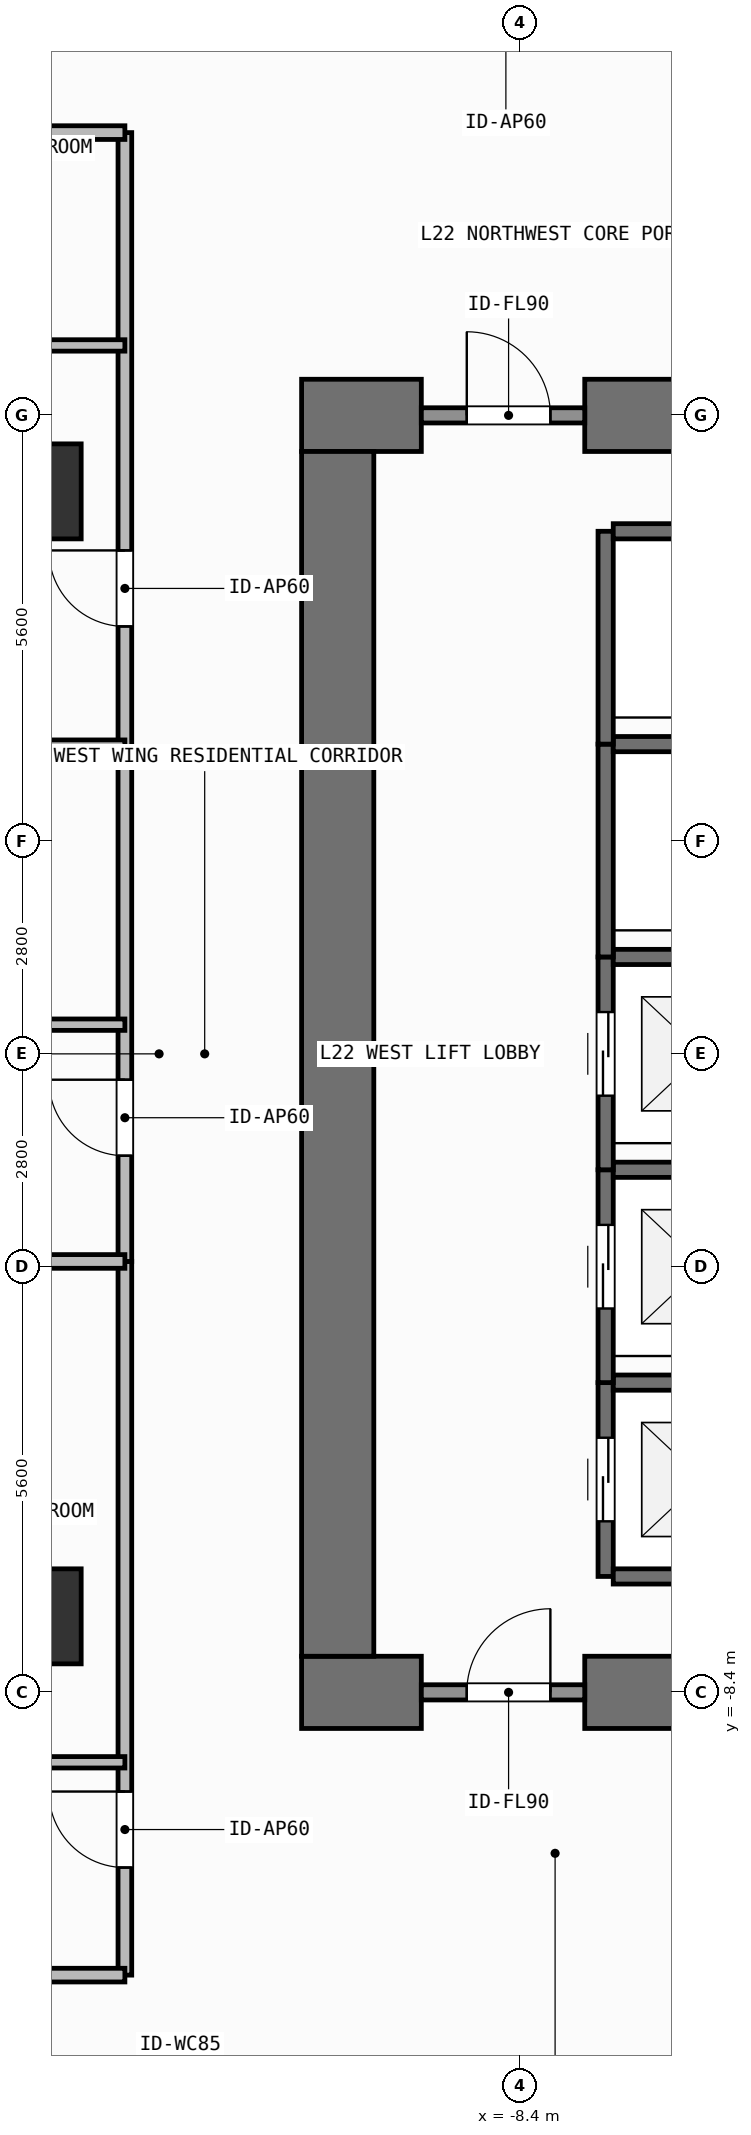
"""IFC4 building model, lengths in metres.
Left out: names, types, materials, properties, quantities, classifications, styles, units other than length and angle.
Written with IfcOpenShell. Run it as: python <this file> out.ifc"""

import sys

from ifc_helpers import new_model, si_unit, direction, frame, frame_2d, origin, origin_2d, place, context, subcontext, project, spatial, rectangle, extrude, element, fill, save


model = new_model("IFC4")
c1 = context("Model", 3, precision=1e-05, world=origin(), true_north=direction((0.0, 1.0)))
c2 = subcontext(c1, "Body", "Model", "MODEL_VIEW")
j1 = project(units=[si_unit("LENGTHUNIT", "METRE"), si_unit("PLANEANGLEUNIT", "RADIAN")], contexts=[c1])
p1 = place(None, origin())
s1 = spatial("IfcSite", under=j1, at=p1, CompositionType="ELEMENT")
p2 = place(p1, origin())
s2 = spatial("IfcBuilding", under=s1, at=p2, CompositionType="ELEMENT")
p3 = place(p2, frame((0.0, 0.0, 89.1)))
s3 = spatial("IfcBuildingStorey", under=s2, at=p3, CompositionType="ELEMENT", Elevation=89.1)
p4 = place(p3, frame((-11.275, -8.4, 0.0), z_axis=(0.0, 0.0, 1.0), x_axis=(1.0, 0.0, 0.0)))
e1 = element("IfcWall", 1, at=p4, inside=s3, PredefinedType="SHEAR", context=c2, shape_type="SweptSolid", body=[
    extrude(rectangle(XDim=1.575, YDim=0.95, at=frame_2d((0.788, 0.0))), origin(), (0.0, 0.0, 1.0), 3.9),
])
p5 = place(p3, frame((-7.55, -8.4, 0.0), z_axis=(0.0, 0.0, 1.0), x_axis=(1.0, 0.0, 0.0)))
e2 = element("IfcWall", 2, at=p5, inside=s3, PredefinedType="SHEAR", context=c2, shape_type="SweptSolid", body=[
    extrude(rectangle(XDim=3.35, YDim=0.95, at=frame_2d((1.675, 0.0))), origin(), (0.0, 0.0, 1.0), 3.9),
])
p6 = place(p3, frame((-11.275, 8.4, 0.0), z_axis=(0.0, 0.0, 1.0), x_axis=(1.0, 0.0, 0.0)))
e3 = element("IfcWall", 3, at=p6, inside=s3, PredefinedType="SHEAR", context=c2, shape_type="SweptSolid", body=[
    extrude(rectangle(XDim=1.575, YDim=0.95, at=frame_2d((0.788, 0.0))), origin(), (0.0, 0.0, 1.0), 3.9),
])
p7 = place(p3, frame((-7.55, 8.4, 0.0), z_axis=(0.0, 0.0, 1.0), x_axis=(1.0, 0.0, 0.0)))
e4 = element("IfcWall", 4, at=p7, inside=s3, PredefinedType="SHEAR", context=c2, shape_type="SweptSolid", body=[
    extrude(rectangle(XDim=16.425, YDim=0.95, at=frame_2d((8.212, 0.0))), origin(), (0.0, 0.0, 1.0), 3.9),
])
p8 = place(p3, frame((-10.8, -7.925, 0.0), z_axis=(0.0, 0.0, 1.0), x_axis=(0.0, 1.0, 0.0)))
e5 = element("IfcWall", 5, at=p8, inside=s3, PredefinedType="SHEAR", context=c2, shape_type="SweptSolid", body=[
    extrude(rectangle(XDim=15.85, YDim=0.95, at=frame_2d((7.925, 0.0))), origin(), (0.0, 0.0, 1.0), 3.9),
])
for number, where, z_axis, x_axis in (
    (6, (-14.8, -7.4, 0.0), (0.0, 0.0, 1.0), (1.0, 0.0, 0.0)),
    (7, (-14.8, 7.4, 0.0), (0.0, 0.0, 1.0), (1.0, 0.0, 0.0)),
):
    element("IfcColumn", number, at=place(p3, frame(where, z_axis=z_axis, x_axis=x_axis)), inside=s3, PredefinedType="COLUMN", context=c2, shape_type="SweptSolid", body=[
        extrude(rectangle(XDim=1.25, YDim=1.25, at=origin_2d()), origin(), (0.0, 0.0, 1.0), 3.9),
    ])
p9 = place(p3, frame((-7.275, -6.875, 0.0), z_axis=(0.0, 0.0, 1.0), x_axis=(0.0, 1.0, 0.0)))
e8 = element("IfcWall", 8, at=p9, inside=s3, PredefinedType="SHEAR", context=c2, shape_type="SweptSolid", body=[
    extrude(rectangle(XDim=2.55, YDim=0.2, at=frame_2d((1.275, 0.0))), origin(), (0.0, 0.0, 1.0), 3.68),
])
p10 = place(p9, frame((0.725, 0.0, 0.0)))
e9 = element("IfcOpeningElement", 9, at=p10, cuts=e8, PredefinedType="OPENING", context=c2, shape_type="SweptSolid", body=[
    extrude(rectangle(XDim=1.1, YDim=2.2, at=frame_2d((0.55, 1.1))), frame((0.0, 0.11, 0.0), z_axis=(0.0, -1.0, 0.0), x_axis=(1.0, 0.0, 0.0)), (0.0, 0.0, 1.0), 0.22),
])
for number, where, z_axis, x_axis in (
    (10, (-7.175, -6.875, 0.0), (0.0, 0.0, 1.0), (1.0, 0.0, 0.0)),
    (11, (-7.175, -4.325, 0.0), (0.0, 0.0, 1.0), (1.0, 0.0, 0.0)),
):
    element("IfcWall", number, at=place(p3, frame(where, z_axis=z_axis, x_axis=x_axis)), inside=s3, PredefinedType="SHEAR", context=c2, shape_type="SweptSolid", body=[
        extrude(rectangle(XDim=2.35, YDim=0.2, at=frame_2d((1.175, 0.0))), origin(), (0.0, 0.0, 1.0), 3.68),
    ])
p11 = place(p3, frame((-7.275, -4.325, 0.0), z_axis=(0.0, 0.0, 1.0), x_axis=(0.0, 1.0, 0.0)))
e12 = element("IfcWall", 12, at=p11, inside=s3, PredefinedType="SHEAR", context=c2, shape_type="SweptSolid", body=[
    extrude(rectangle(XDim=2.8, YDim=0.2, at=frame_2d((1.4, 0.0))), origin(), (0.0, 0.0, 1.0), 3.68),
])
p12 = place(p11, frame((0.975, 0.0, 0.0)))
e13 = element("IfcOpeningElement", 13, at=p12, cuts=e12, PredefinedType="OPENING", context=c2, shape_type="SweptSolid", body=[
    extrude(rectangle(XDim=1.1, YDim=2.2, at=frame_2d((0.55, 1.1))), frame((0.0, 0.11, 0.0), z_axis=(0.0, -1.0, 0.0), x_axis=(1.0, 0.0, 0.0)), (0.0, 0.0, 1.0), 0.22),
])
p13 = place(p3, frame((-7.175, -1.525, 0.0), z_axis=(0.0, 0.0, 1.0), x_axis=(1.0, 0.0, 0.0)))
e14 = element("IfcWall", 14, at=p13, inside=s3, PredefinedType="SHEAR", context=c2, shape_type="SweptSolid", body=[
    extrude(rectangle(XDim=2.35, YDim=0.2, at=frame_2d((1.175, 0.0))), origin(), (0.0, 0.0, 1.0), 3.68),
])
p14 = place(p3, frame((-7.275, -1.525, 0.0), z_axis=(0.0, 0.0, 1.0), x_axis=(0.0, 1.0, 0.0)))
e15 = element("IfcWall", 15, at=p14, inside=s3, PredefinedType="SHEAR", context=c2, shape_type="SweptSolid", body=[
    extrude(rectangle(XDim=2.8, YDim=0.2, at=frame_2d((1.4, 0.0))), origin(), (0.0, 0.0, 1.0), 3.68),
])
p15 = place(p14, frame((0.975, 0.0, 0.0)))
e16 = element("IfcOpeningElement", 16, at=p15, cuts=e15, PredefinedType="OPENING", context=c2, shape_type="SweptSolid", body=[
    extrude(rectangle(XDim=1.1, YDim=2.2, at=frame_2d((0.55, 1.1))), frame((0.0, 0.11, 0.0), z_axis=(0.0, -1.0, 0.0), x_axis=(1.0, 0.0, 0.0)), (0.0, 0.0, 1.0), 0.22),
])
p16 = place(p3, frame((-7.175, 1.275, 0.0), z_axis=(0.0, 0.0, 1.0), x_axis=(1.0, 0.0, 0.0)))
e17 = element("IfcWall", 17, at=p16, inside=s3, PredefinedType="SHEAR", context=c2, shape_type="SweptSolid", body=[
    extrude(rectangle(XDim=2.35, YDim=0.2, at=frame_2d((1.175, 0.0))), origin(), (0.0, 0.0, 1.0), 3.68),
])
p17 = place(p3, frame((-7.275, 1.275, 0.0), z_axis=(0.0, 0.0, 1.0), x_axis=(0.0, 1.0, 0.0)))
e18 = element("IfcWall", 18, at=p17, inside=s3, PredefinedType="SHEAR", context=c2, shape_type="SweptSolid", body=[
    extrude(rectangle(XDim=2.8, YDim=0.2, at=frame_2d((1.4, 0.0))), origin(), (0.0, 0.0, 1.0), 3.68),
])
p18 = place(p3, frame((-7.175, 4.075, 0.0), z_axis=(0.0, 0.0, 1.0), x_axis=(1.0, 0.0, 0.0)))
e19 = element("IfcWall", 19, at=p18, inside=s3, PredefinedType="SHEAR", context=c2, shape_type="SweptSolid", body=[
    extrude(rectangle(XDim=2.35, YDim=0.2, at=frame_2d((1.175, 0.0))), origin(), (0.0, 0.0, 1.0), 3.68),
])
p19 = place(p3, frame((-7.275, 4.075, 0.0), z_axis=(0.0, 0.0, 1.0), x_axis=(0.0, 1.0, 0.0)))
e20 = element("IfcWall", 20, at=p19, inside=s3, PredefinedType="SHEAR", context=c2, shape_type="SweptSolid", body=[
    extrude(rectangle(XDim=2.8, YDim=0.2, at=frame_2d((1.4, 0.0))), origin(), (0.0, 0.0, 1.0), 3.68),
])
p20 = place(p3, frame((-7.175, 6.875, 0.0), z_axis=(0.0, 0.0, 1.0), x_axis=(1.0, 0.0, 0.0)))
e21 = element("IfcWall", 21, at=p20, inside=s3, PredefinedType="SHEAR", context=c2, shape_type="SweptSolid", body=[
    extrude(rectangle(XDim=2.35, YDim=0.2, at=frame_2d((1.175, 0.0))), origin(), (0.0, 0.0, 1.0), 3.68),
])
p21 = place(p3, frame((-9.7, -8.4, 0.0), z_axis=(0.0, 0.0, 1.0), x_axis=(1.0, 0.0, 0.0)))
e22 = element("IfcWall", 22, at=p21, inside=s3, PredefinedType="SOLIDWALL", context=c2, shape_type="SweptSolid", body=[
    extrude(rectangle(XDim=2.15, YDim=0.2, at=frame_2d((1.075, 0.0))), origin(), (0.0, 0.0, 1.0), 2.72),
])
p22 = place(p21, frame((0.598, 0.0, 0.0)))
e23 = element("IfcOpeningElement", 23, at=p22, cuts=e22, PredefinedType="OPENING", context=c2, shape_type="SweptSolid", body=[
    extrude(rectangle(XDim=1.1, YDim=2.15, at=frame_2d((0.55, 1.075))), frame((0.0, 0.11, 0.0), z_axis=(0.0, -1.0, 0.0), x_axis=(1.0, 0.0, 0.0)), (0.0, 0.0, 1.0), 0.22),
])
p23 = place(p3, frame((-9.7, 8.4, 0.0), z_axis=(0.0, 0.0, 1.0), x_axis=(1.0, 0.0, 0.0)))
e24 = element("IfcWall", 24, at=p23, inside=s3, PredefinedType="SOLIDWALL", context=c2, shape_type="SweptSolid", body=[
    extrude(rectangle(XDim=2.15, YDim=0.2, at=frame_2d((1.075, 0.0))), origin(), (0.0, 0.0, 1.0), 2.72),
])
p24 = place(p23, frame((0.598, 0.0, 0.0)))
e25 = element("IfcOpeningElement", 25, at=p24, cuts=e24, PredefinedType="OPENING", context=c2, shape_type="SweptSolid", body=[
    extrude(rectangle(XDim=1.1, YDim=2.15, at=frame_2d((0.55, 1.075))), frame((0.0, 0.11, 0.0), z_axis=(0.0, -1.0, 0.0), x_axis=(1.0, 0.0, 0.0)), (0.0, 0.0, 1.0), 0.22),
])
p25 = place(p3, frame((-13.6, -12.12, 0.0), z_axis=(0.0, 0.0, 1.0), x_axis=(0.0, 1.0, 0.0)))
e26 = element("IfcWall", 26, at=p25, inside=s3, PredefinedType="PARTITIONING", context=c2, shape_type="SweptSolid", body=[
    extrude(rectangle(XDim=9.389, YDim=0.18, at=frame_2d((4.695, 0.0))), origin(), (0.0, 0.0, 1.0), 3.68),
])
p26 = place(p25, frame((1.415, 0.0, 0.0)))
e27 = element("IfcOpeningElement", 27, at=p26, cuts=e26, PredefinedType="OPENING", context=c2, shape_type="SweptSolid", body=[
    extrude(rectangle(XDim=1.0, YDim=2.2, at=frame_2d((0.5, 1.1))), frame((0.0, 0.1, 0.0), z_axis=(0.0, -1.0, 0.0), x_axis=(1.0, 0.0, 0.0)), (0.0, 0.0, 1.0), 0.2),
])
p27 = place(p3, frame((-16.863, -9.32, 0.0), z_axis=(0.0, 0.0, 1.0), x_axis=(1.0, 0.0, 0.0)))
e28 = element("IfcWall", 28, at=p27, inside=s3, PredefinedType="PARTITIONING", context=c2, shape_type="SweptSolid", body=[
    extrude(rectangle(XDim=3.263, YDim=0.15, at=frame_2d((1.631, 0.0))), origin(), (0.0, 0.0, 1.0), 3.68),
])
p28 = place(p27, frame((0.509, 0.0, 0.0)))
e29 = element("IfcOpeningElement", 29, at=p28, cuts=e28, PredefinedType="OPENING", context=c2, shape_type="SweptSolid", body=[
    extrude(rectangle(XDim=0.85, YDim=2.1, at=frame_2d((0.425, 1.05))), frame((0.0, 0.085, 0.0), z_axis=(0.0, -1.0, 0.0), x_axis=(1.0, 0.0, 0.0)), (0.0, 0.0, 1.0), 0.17),
])
p29 = place(p3, frame((-13.6, -2.731, 0.0), z_axis=(0.0, 0.0, 1.0), x_axis=(0.0, 1.0, 0.0)))
e30 = element("IfcWall", 30, at=p29, inside=s3, PredefinedType="PARTITIONING", context=c2, shape_type="SweptSolid", body=[
    extrude(rectangle(XDim=6.771, YDim=0.18, at=frame_2d((3.385, 0.0))), origin(), (0.0, 0.0, 1.0), 3.68),
])
p30 = place(p29, frame((1.391, 0.0, 0.0)))
e31 = element("IfcOpeningElement", 31, at=p30, cuts=e30, PredefinedType="OPENING", context=c2, shape_type="SweptSolid", body=[
    extrude(rectangle(XDim=1.0, YDim=2.2, at=frame_2d((0.5, 1.1))), frame((0.0, 0.1, 0.0), z_axis=(0.0, -1.0, 0.0), x_axis=(1.0, 0.0, 0.0)), (0.0, 0.0, 1.0), 0.2),
])
p31 = place(p3, frame((-16.902, 0.384, 0.0), z_axis=(0.0, 0.0, 1.0), x_axis=(1.0, 0.0, 0.0)))
e32 = element("IfcWall", 32, at=p31, inside=s3, PredefinedType="PARTITIONING", context=c2, shape_type="SweptSolid", body=[
    extrude(rectangle(XDim=3.302, YDim=0.15, at=frame_2d((1.651, 0.0))), origin(), (0.0, 0.0, 1.0), 3.68),
])
p32 = place(p31, frame((1.226, 0.0, 0.0)))
e33 = element("IfcOpeningElement", 33, at=p32, cuts=e32, PredefinedType="OPENING", context=c2, shape_type="SweptSolid", body=[
    extrude(rectangle(XDim=0.85, YDim=2.1, at=frame_2d((0.425, 1.05))), frame((0.0, 0.085, 0.0), z_axis=(0.0, -1.0, 0.0), x_axis=(1.0, 0.0, 0.0)), (0.0, 0.0, 1.0), 0.17),
])
p33 = place(p3, frame((-13.6, 4.04, 0.0), z_axis=(0.0, 0.0, 1.0), x_axis=(0.0, 1.0, 0.0)))
e34 = element("IfcWall", 34, at=p33, inside=s3, PredefinedType="PARTITIONING", context=c2, shape_type="SweptSolid", body=[
    extrude(rectangle(XDim=8.08, YDim=0.18, at=frame_2d((4.04, 0.0))), origin(), (0.0, 0.0, 1.0), 3.68),
])
p34 = place(p33, frame((1.583, 0.0, 0.0)))
e35 = element("IfcOpeningElement", 35, at=p34, cuts=e34, PredefinedType="OPENING", context=c2, shape_type="SweptSolid", body=[
    extrude(rectangle(XDim=1.0, YDim=2.2, at=frame_2d((0.5, 1.1))), frame((0.0, 0.1, 0.0), z_axis=(0.0, -1.0, 0.0), x_axis=(1.0, 0.0, 0.0)), (0.0, 0.0, 1.0), 0.2),
])
p35 = place(p3, frame((-16.902, 9.32, 0.0), z_axis=(0.0, 0.0, 1.0), x_axis=(1.0, 0.0, 0.0)))
e36 = element("IfcWall", 36, at=p35, inside=s3, PredefinedType="PARTITIONING", context=c2, shape_type="SweptSolid", body=[
    extrude(rectangle(XDim=3.302, YDim=0.15, at=frame_2d((1.651, 0.0))), origin(), (0.0, 0.0, 1.0), 3.68),
])
p36 = place(p35, frame((0.515, 0.0, 0.0)))
e37 = element("IfcOpeningElement", 37, at=p36, cuts=e36, PredefinedType="OPENING", context=c2, shape_type="SweptSolid", body=[
    extrude(rectangle(XDim=0.85, YDim=2.1, at=frame_2d((0.425, 1.05))), frame((0.0, 0.085, 0.0), z_axis=(0.0, -1.0, 0.0), x_axis=(1.0, 0.0, 0.0)), (0.0, 0.0, 1.0), 0.17),
])
for number, where, z_axis, x_axis in (
    (38, (-27.93, -2.731, 0.0), (0.0, 0.0, 1.0), (1.0, 0.0, 0.0)),
    (39, (-27.93, 4.04, 0.0), (0.0, 0.0, 1.0), (1.0, 0.0, 0.0)),
    (40, (-27.93, -12.12, 0.0), (0.0, 0.0, 1.0), (1.0, 0.0, 0.0)),
    (41, (-27.93, 12.12, 0.0), (0.0, 0.0, 1.0), (1.0, 0.0, 0.0)),
):
    element("IfcWall", number, at=place(p3, frame(where, z_axis=z_axis, x_axis=x_axis)), inside=s3, PredefinedType="PARTITIONING", context=c2, shape_type="SweptSolid", body=[
        extrude(rectangle(XDim=14.33, YDim=0.18, at=frame_2d((7.165, 0.0))), origin(), (0.0, 0.0, 1.0), 3.68),
    ])
p37 = place(p10, origin())
e42 = element("IfcDoor", 42, at=p37, inside=s3, OperationType="SLIDING_TO_LEFT", PredefinedType="DOOR", context=c2, shape_type="SweptSolid", body=[
    extrude(rectangle(XDim=1.1, YDim=2.2, at=frame_2d((0.55, 1.1))), frame((0.0, 0.025, 0.0), z_axis=(0.0, -1.0, 0.0), x_axis=(1.0, 0.0, 0.0)), (0.0, 0.0, 1.0), 0.05),
])
fill(e9, e42)
p38 = place(p12, origin())
e43 = element("IfcDoor", 43, at=p38, inside=s3, OperationType="SLIDING_TO_LEFT", PredefinedType="DOOR", context=c2, shape_type="SweptSolid", body=[
    extrude(rectangle(XDim=1.1, YDim=2.2, at=frame_2d((0.55, 1.1))), frame((0.0, 0.025, 0.0), z_axis=(0.0, -1.0, 0.0), x_axis=(1.0, 0.0, 0.0)), (0.0, 0.0, 1.0), 0.05),
])
fill(e13, e43)
p39 = place(p15, origin())
e44 = element("IfcDoor", 44, at=p39, inside=s3, OperationType="SLIDING_TO_LEFT", PredefinedType="DOOR", context=c2, shape_type="SweptSolid", body=[
    extrude(rectangle(XDim=1.1, YDim=2.2, at=frame_2d((0.55, 1.1))), frame((0.0, 0.025, 0.0), z_axis=(0.0, -1.0, 0.0), x_axis=(1.0, 0.0, 0.0)), (0.0, 0.0, 1.0), 0.05),
])
fill(e16, e44)
p40 = place(p22, origin())
e45 = element("IfcDoor", 45, at=p40, inside=s3, OperationType="SINGLE_SWING_RIGHT", PredefinedType="DOOR", context=c2, shape_type="SweptSolid", body=[
    extrude(rectangle(XDim=1.1, YDim=2.15, at=frame_2d((0.55, 1.075))), frame((0.0, 0.025, 0.0), z_axis=(0.0, -1.0, 0.0), x_axis=(1.0, 0.0, 0.0)), (0.0, 0.0, 1.0), 0.05),
])
fill(e23, e45)
p41 = place(p24, origin())
e46 = element("IfcDoor", 46, at=p41, inside=s3, OperationType="SINGLE_SWING_LEFT", PredefinedType="DOOR", context=c2, shape_type="SweptSolid", body=[
    extrude(rectangle(XDim=1.1, YDim=2.15, at=frame_2d((0.55, 1.075))), frame((0.0, 0.025, 0.0), z_axis=(0.0, -1.0, 0.0), x_axis=(1.0, 0.0, 0.0)), (0.0, 0.0, 1.0), 0.05),
])
fill(e25, e46)
p42 = place(p26, origin())
e47 = element("IfcDoor", 47, at=p42, inside=s3, OperationType="SINGLE_SWING_RIGHT", PredefinedType="DOOR", context=c2, shape_type="SweptSolid", body=[
    extrude(rectangle(XDim=1.0, YDim=2.2, at=frame_2d((0.5, 1.1))), frame((0.0, 0.025, 0.0), z_axis=(0.0, -1.0, 0.0), x_axis=(1.0, 0.0, 0.0)), (0.0, 0.0, 1.0), 0.05),
])
fill(e27, e47)
p43 = place(p30, origin())
e48 = element("IfcDoor", 48, at=p43, inside=s3, OperationType="SINGLE_SWING_RIGHT", PredefinedType="DOOR", context=c2, shape_type="SweptSolid", body=[
    extrude(rectangle(XDim=1.0, YDim=2.2, at=frame_2d((0.5, 1.1))), frame((0.0, 0.025, 0.0), z_axis=(0.0, -1.0, 0.0), x_axis=(1.0, 0.0, 0.0)), (0.0, 0.0, 1.0), 0.05),
])
fill(e31, e48)
p44 = place(p34, origin())
e49 = element("IfcDoor", 49, at=p44, inside=s3, OperationType="SINGLE_SWING_RIGHT", PredefinedType="DOOR", context=c2, shape_type="SweptSolid", body=[
    extrude(rectangle(XDim=1.0, YDim=2.2, at=frame_2d((0.5, 1.1))), frame((0.0, 0.025, 0.0), z_axis=(0.0, -1.0, 0.0), x_axis=(1.0, 0.0, 0.0)), (0.0, 0.0, 1.0), 0.05),
])
fill(e35, e49)
save(model, sys.argv[1])
